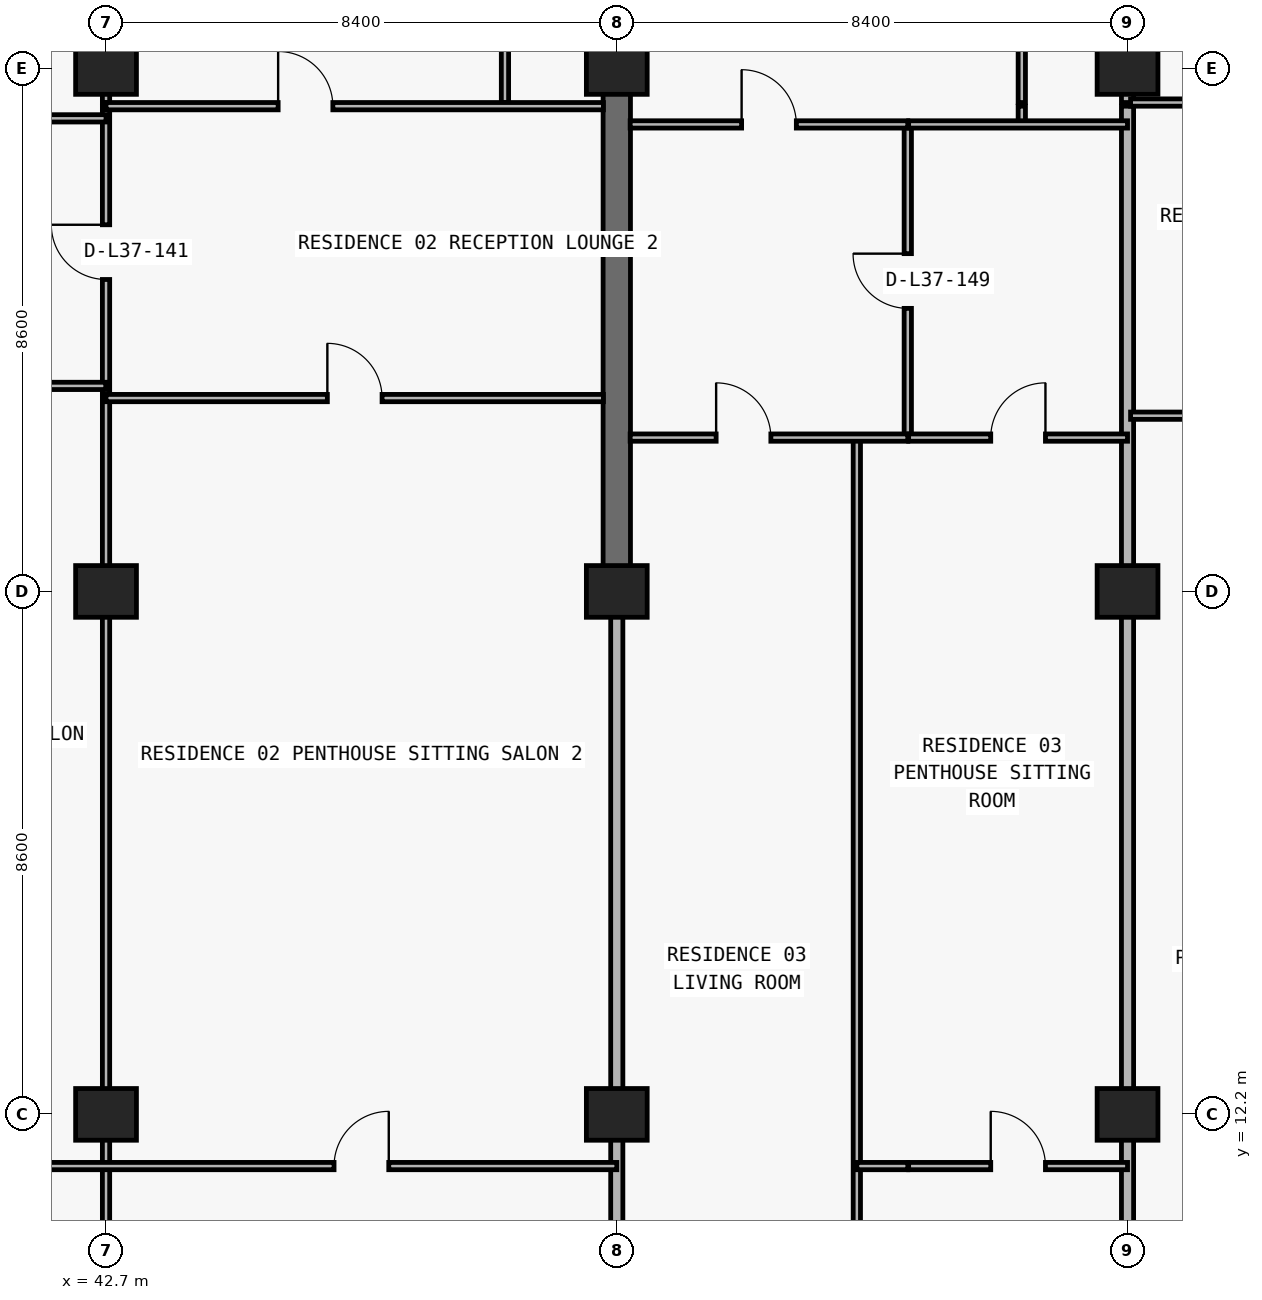
"""IFC4 building model, lengths in metres.
Left out: names, types, materials, properties, quantities, classifications, styles, units other than length and angle.
Written with IfcOpenShell. Run it as: python <this file> out.ifc"""

import sys

from ifc_helpers import new_model, si_unit, direction, frame, frame_2d, origin, origin_2d, place, context, subcontext, project, spatial, rectangle, extrude, element, fill, save


model = new_model("IFC4")
c1 = context("Model", 3, precision=1e-05, world=origin(), true_north=direction((0.0, 1.0)))
c2 = subcontext(c1, "Body", "Model", "MODEL_VIEW")
j1 = project(units=[si_unit("LENGTHUNIT", "METRE"), si_unit("PLANEANGLEUNIT", "RADIAN")], contexts=[c1])
p1 = place(None, origin())
s1 = spatial("IfcSite", under=j1, at=p1, CompositionType="ELEMENT")
p2 = place(p1, origin())
s2 = spatial("IfcBuilding", under=s1, at=p2, CompositionType="ELEMENT")
p3 = place(p2, frame((0.0, 0.0, 135.6)))
s3 = spatial("IfcBuildingStorey", under=s2, at=p3, CompositionType="ELEMENT", Elevation=135.6)
for number, where, z_axis, x_axis in (
    (1, (42.7, 12.2, 0.0), (0.0, 0.0, 1.0), (1.0, 0.0, 0.0)),
    (2, (51.1, 12.2, 0.0), (0.0, 0.0, 1.0), (1.0, 0.0, 0.0)),
    (3, (59.5, 12.2, 0.0), (0.0, 0.0, 1.0), (1.0, 0.0, 0.0)),
    (4, (42.7, 20.8, 0.0), (0.0, 0.0, 1.0), (1.0, 0.0, 0.0)),
    (5, (51.1, 20.8, 0.0), (0.0, 0.0, 1.0), (1.0, 0.0, 0.0)),
    (6, (59.5, 20.8, 0.0), (0.0, 0.0, 1.0), (1.0, 0.0, 0.0)),
    (7, (42.7, 29.4, 0.0), (0.0, 0.0, 1.0), (1.0, 0.0, 0.0)),
    (8, (51.1, 29.4, 0.0), (0.0, 0.0, 1.0), (1.0, 0.0, 0.0)),
    (9, (59.5, 29.4, 0.0), (0.0, 0.0, 1.0), (1.0, 0.0, 0.0)),
):
    element("IfcColumn", number, at=place(p3, frame(where, z_axis=z_axis, x_axis=x_axis)), inside=s3, PredefinedType="COLUMN", context=c2, shape_type="SweptSolid", body=[
        extrude(rectangle(XDim=1.0, YDim=0.85, at=origin_2d()), origin(), (0.0, 0.0, 1.0), 3.05),
    ])
p4 = place(p3, frame((51.1, 20.8, 0.0), z_axis=(0.0, 0.0, 1.0), x_axis=(0.0, 1.0, 0.0)))
e10 = element("IfcWall", 10, at=p4, inside=s3, PredefinedType="SHEAR", context=c2, shape_type="SweptSolid", body=[
    extrude(rectangle(XDim=8.6, YDim=0.45, at=frame_2d((4.3, 0.0))), origin(), (0.0, 0.0, 1.0), 3.05),
])
p5 = place(p3, frame((42.7, 8.84, 0.0), z_axis=(0.0, 0.0, 1.0), x_axis=(0.0, 1.0, 0.0)))
e11 = element("IfcWall", 11, at=p5, inside=s3, PredefinedType="PARTITIONING", context=c2, shape_type="SweptSolid", body=[
    extrude(rectangle(XDim=19.94, YDim=0.12, at=frame_2d((9.97, 0.0))), origin(), (0.0, 0.0, 1.0), 2.174),
])
p6 = place(p5, frame((17.09, 0.0, 0.0)))
e12 = element("IfcOpeningElement", 12, at=p6, cuts=e11, PredefinedType="OPENING", context=c2, shape_type="SweptSolid", body=[
    extrude(rectangle(XDim=0.9, YDim=2.124, at=frame_2d((0.45, 1.062))), frame((0.0, 0.07, 0.0), z_axis=(0.0, -1.0, 0.0), x_axis=(1.0, 0.0, 0.0)), (0.0, 0.0, 1.0), 0.14),
])
p7 = place(p3, frame((42.7, 28.84, 0.0), z_axis=(0.0, 0.0, 1.0), x_axis=(0.0, 1.0, 0.0)))
e13 = element("IfcWall", 13, at=p7, inside=s3, PredefinedType="PARTITIONING", context=c2, shape_type="SweptSolid", body=[
    extrude(rectangle(XDim=5.16, YDim=0.12, at=frame_2d((2.58, 0.0))), origin(), (0.0, 0.0, 1.0), 2.174),
])
p8 = place(p3, frame((49.261, 28.84, 0.0), z_axis=(0.0, 0.0, 1.0), x_axis=(0.0, 1.0, 0.0)))
e14 = element("IfcWall", 14, at=p8, inside=s3, PredefinedType="PARTITIONING", context=c2, shape_type="SweptSolid", body=[
    extrude(rectangle(XDim=5.16, YDim=0.12, at=frame_2d((2.58, 0.0))), origin(), (0.0, 0.0, 1.0), 2.679),
])
p9 = place(p8, frame((2.155, 0.0, 0.0)))
e15 = element("IfcOpeningElement", 15, at=p9, cuts=e14, PredefinedType="OPENING", context=c2, shape_type="SweptSolid", body=[
    extrude(rectangle(XDim=0.85, YDim=2.1, at=frame_2d((0.425, 1.05))), frame((0.0, 0.07, 0.0), z_axis=(0.0, -1.0, 0.0), x_axis=(1.0, 0.0, 0.0)), (0.0, 0.0, 1.0), 0.14),
])
p10 = place(p3, frame((51.1, 8.84, 0.0), z_axis=(0.0, 0.0, 1.0), x_axis=(0.0, 1.0, 0.0)))
e16 = element("IfcWall", 16, at=p10, inside=s3, PredefinedType="PARTITIONING", context=c2, shape_type="SweptSolid", body=[
    extrude(rectangle(XDim=11.955, YDim=0.2, at=frame_2d((5.978, 0.0))), origin(), (0.0, 0.0, 1.0), 2.174),
])
p11 = place(p3, frame((51.1, 29.405, 0.0), z_axis=(0.0, 0.0, 1.0), x_axis=(0.0, 1.0, 0.0)))
e17 = element("IfcWall", 17, at=p11, inside=s3, PredefinedType="PARTITIONING", context=c2, shape_type="SweptSolid", body=[
    extrude(rectangle(XDim=4.595, YDim=0.2, at=frame_2d((2.297, 0.0))), origin(), (0.0, 0.0, 1.0), 2.335),
])
p12 = place(p3, frame((55.048, 8.84, 0.0), z_axis=(0.0, 0.0, 1.0), x_axis=(0.0, 1.0, 0.0)))
e18 = element("IfcWall", 18, at=p12, inside=s3, PredefinedType="PARTITIONING", context=c2, shape_type="SweptSolid", body=[
    extrude(rectangle(XDim=14.49, YDim=0.12, at=frame_2d((7.245, 0.0))), origin(), (0.0, 0.0, 1.0), 3.05),
])
p13 = place(p3, frame((55.886, 23.33, 0.0), z_axis=(0.0, 0.0, 1.0), x_axis=(0.0, 1.0, 0.0)))
e19 = element("IfcWall", 19, at=p13, inside=s3, PredefinedType="PARTITIONING", context=c2, shape_type="SweptSolid", body=[
    extrude(rectangle(XDim=5.15, YDim=0.12, at=frame_2d((2.575, 0.0))), origin(), (0.0, 0.0, 1.0), 3.05),
])
p14 = place(p13, frame((2.125, 0.0, 0.0)))
e20 = element("IfcOpeningElement", 20, at=p14, cuts=e19, PredefinedType="OPENING", context=c2, shape_type="SweptSolid", body=[
    extrude(rectangle(XDim=0.9, YDim=2.15, at=frame_2d((0.45, 1.075))), frame((0.0, 0.07, 0.0), z_axis=(0.0, -1.0, 0.0), x_axis=(1.0, 0.0, 0.0)), (0.0, 0.0, 1.0), 0.14),
])
p15 = place(p3, frame((57.761, 28.48, 0.0), z_axis=(0.0, 0.0, 1.0), x_axis=(0.0, 1.0, 0.0)))
e21 = element("IfcWall", 21, at=p15, inside=s3, PredefinedType="PARTITIONING", context=c2, shape_type="SweptSolid", body=[
    extrude(rectangle(XDim=0.3, YDim=0.12, at=frame_2d((0.15, 0.0))), origin(), (0.0, 0.0, 1.0), 3.05),
])
p16 = place(p3, frame((57.761, 28.84, 0.0), z_axis=(0.0, 0.0, 1.0), x_axis=(0.0, 1.0, 0.0)))
e22 = element("IfcWall", 22, at=p16, inside=s3, PredefinedType="PARTITIONING", context=c2, shape_type="SweptSolid", body=[
    extrude(rectangle(XDim=5.16, YDim=0.12, at=frame_2d((2.58, 0.0))), origin(), (0.0, 0.0, 1.0), 3.05),
])
p17 = place(p16, frame((2.155, 0.0, 0.0)))
e23 = element("IfcOpeningElement", 23, at=p17, cuts=e22, PredefinedType="OPENING", context=c2, shape_type="SweptSolid", body=[
    extrude(rectangle(XDim=0.85, YDim=2.1, at=frame_2d((0.425, 1.05))), frame((0.0, 0.07, 0.0), z_axis=(0.0, -1.0, 0.0), x_axis=(1.0, 0.0, 0.0)), (0.0, 0.0, 1.0), 0.14),
])
p18 = place(p3, frame((59.5, 8.84, 0.0), z_axis=(0.0, 0.0, 1.0), x_axis=(0.0, 1.0, 0.0)))
e24 = element("IfcWall", 24, at=p18, inside=s3, PredefinedType="PARTITIONING", context=c2, shape_type="SweptSolid", body=[
    extrude(rectangle(XDim=19.94, YDim=0.2, at=frame_2d((9.97, 0.0))), origin(), (0.0, 0.0, 1.0), 2.174),
])
p19 = place(p3, frame((59.5, 28.84, 0.0), z_axis=(0.0, 0.0, 1.0), x_axis=(0.0, 1.0, 0.0)))
e25 = element("IfcWall", 25, at=p19, inside=s3, PredefinedType="PARTITIONING", context=c2, shape_type="SweptSolid", body=[
    extrude(rectangle(XDim=5.16, YDim=0.2, at=frame_2d((2.58, 0.0))), origin(), (0.0, 0.0, 1.0), 2.174),
])
p20 = place(p3, frame((35.1, 11.35, 0.0), z_axis=(0.0, 0.0, 1.0), x_axis=(1.0, 0.0, 0.0)))
e26 = element("IfcWall", 26, at=p20, inside=s3, PredefinedType="PARTITIONING", context=c2, shape_type="SweptSolid", body=[
    extrude(rectangle(XDim=16.0, YDim=0.12, at=frame_2d((8.0, 0.0))), origin(), (0.0, 0.0, 1.0), 3.05),
])
p21 = place(p20, frame((3.35, 0.0, 0.0)))
e27 = element("IfcOpeningElement", 27, at=p21, cuts=e26, PredefinedType="OPENING", context=c2, shape_type="SweptSolid", body=[
    extrude(rectangle(XDim=0.9, YDim=2.15, at=frame_2d((0.45, 1.075))), frame((0.0, 0.07, 0.0), z_axis=(0.0, -1.0, 0.0), x_axis=(1.0, 0.0, 0.0)), (0.0, 0.0, 1.0), 0.14),
])
p22 = place(p20, frame((11.35, 0.0, 0.0)))
e28 = element("IfcOpeningElement", 28, at=p22, cuts=e26, PredefinedType="OPENING", context=c2, shape_type="SweptSolid", body=[
    extrude(rectangle(XDim=0.9, YDim=2.15, at=frame_2d((0.45, 1.075))), frame((0.0, 0.07, 0.0), z_axis=(0.0, -1.0, 0.0), x_axis=(1.0, 0.0, 0.0)), (0.0, 0.0, 1.0), 0.14),
])
p23 = place(p3, frame((55.048, 11.35, 0.0), z_axis=(0.0, 0.0, 1.0), x_axis=(1.0, 0.0, 0.0)))
e29 = element("IfcWall", 29, at=p23, inside=s3, PredefinedType="PARTITIONING", context=c2, shape_type="SweptSolid", body=[
    extrude(rectangle(XDim=0.838, YDim=0.12, at=frame_2d((0.419, 0.0))), origin(), (0.0, 0.0, 1.0), 3.05),
])
p24 = place(p3, frame((55.9, 11.35, 0.0), z_axis=(0.0, 0.0, 1.0), x_axis=(1.0, 0.0, 0.0)))
e30 = element("IfcWall", 30, at=p24, inside=s3, PredefinedType="PARTITIONING", context=c2, shape_type="SweptSolid", body=[
    extrude(rectangle(XDim=3.6, YDim=0.12, at=frame_2d((1.8, 0.0))), origin(), (0.0, 0.0, 1.0), 3.05),
])
p25 = place(p24, frame((1.35, 0.0, 0.0)))
e31 = element("IfcOpeningElement", 31, at=p25, cuts=e30, PredefinedType="OPENING", context=c2, shape_type="SweptSolid", body=[
    extrude(rectangle(XDim=0.9, YDim=2.15, at=frame_2d((0.45, 1.075))), frame((0.0, 0.07, 0.0), z_axis=(0.0, -1.0, 0.0), x_axis=(1.0, 0.0, 0.0)), (0.0, 0.0, 1.0), 0.14),
])
p26 = place(p3, frame((51.32, 23.33, 0.0), z_axis=(0.0, 0.0, 1.0), x_axis=(1.0, 0.0, 0.0)))
e32 = element("IfcWall", 32, at=p26, inside=s3, PredefinedType="PARTITIONING", context=c2, shape_type="SweptSolid", body=[
    extrude(rectangle(XDim=4.566, YDim=0.12, at=frame_2d((2.283, 0.0))), origin(), (0.0, 0.0, 1.0), 3.05),
])
p27 = place(p26, frame((1.414, 0.0, 0.0)))
e33 = element("IfcOpeningElement", 33, at=p27, cuts=e32, PredefinedType="OPENING", context=c2, shape_type="SweptSolid", body=[
    extrude(rectangle(XDim=0.9, YDim=2.15, at=frame_2d((0.45, 1.075))), frame((0.0, 0.07, 0.0), z_axis=(0.0, -1.0, 0.0), x_axis=(1.0, 0.0, 0.0)), (0.0, 0.0, 1.0), 0.14),
])
p28 = place(p3, frame((55.9, 23.33, 0.0), z_axis=(0.0, 0.0, 1.0), x_axis=(1.0, 0.0, 0.0)))
e34 = element("IfcWall", 34, at=p28, inside=s3, PredefinedType="PARTITIONING", context=c2, shape_type="SweptSolid", body=[
    extrude(rectangle(XDim=3.6, YDim=0.12, at=frame_2d((1.8, 0.0))), origin(), (0.0, 0.0, 1.0), 3.05),
])
p29 = place(p28, frame((1.35, 0.0, 0.0)))
e35 = element("IfcOpeningElement", 35, at=p29, cuts=e34, PredefinedType="OPENING", context=c2, shape_type="SweptSolid", body=[
    extrude(rectangle(XDim=0.9, YDim=2.15, at=frame_2d((0.45, 1.075))), frame((0.0, 0.07, 0.0), z_axis=(0.0, -1.0, 0.0), x_axis=(1.0, 0.0, 0.0)), (0.0, 0.0, 1.0), 0.14),
])
p30 = place(p3, frame((59.55, 23.69, 0.0), z_axis=(0.0, 0.0, 1.0), x_axis=(1.0, 0.0, 0.0)))
e36 = element("IfcWall", 36, at=p30, inside=s3, PredefinedType="PARTITIONING", context=c2, shape_type="SweptSolid", body=[
    extrude(rectangle(XDim=8.35, YDim=0.12, at=frame_2d((4.175, 0.0))), origin(), (0.0, 0.0, 1.0), 3.05),
])
p31 = place(p30, frame((1.668, 0.0, 0.0)))
e37 = element("IfcOpeningElement", 37, at=p31, cuts=e36, PredefinedType="OPENING", context=c2, shape_type="SweptSolid", body=[
    extrude(rectangle(XDim=0.9, YDim=2.15, at=frame_2d((0.45, 1.075))), frame((0.0, 0.07, 0.0), z_axis=(0.0, -1.0, 0.0), x_axis=(1.0, 0.0, 0.0)), (0.0, 0.0, 1.0), 0.14),
])
p32 = place(p30, frame((6.01, 0.0, 0.0)))
e38 = element("IfcOpeningElement", 38, at=p32, cuts=e36, PredefinedType="OPENING", context=c2, shape_type="SweptSolid", body=[
    extrude(rectangle(XDim=0.9, YDim=2.15, at=frame_2d((0.45, 1.075))), frame((0.0, 0.07, 0.0), z_axis=(0.0, -1.0, 0.0), x_axis=(1.0, 0.0, 0.0)), (0.0, 0.0, 1.0), 0.14),
])
p33 = place(p3, frame((42.7, 23.98, 0.0), z_axis=(0.0, 0.0, 1.0), x_axis=(1.0, 0.0, 0.0)))
e39 = element("IfcWall", 39, at=p33, inside=s3, PredefinedType="PARTITIONING", context=c2, shape_type="SweptSolid", body=[
    extrude(rectangle(XDim=8.18, YDim=0.12, at=frame_2d((4.09, 0.0))), origin(), (0.0, 0.0, 1.0), 3.05),
])
p34 = place(p33, frame((3.64, 0.0, 0.0)))
e40 = element("IfcOpeningElement", 40, at=p34, cuts=e39, PredefinedType="OPENING", context=c2, shape_type="SweptSolid", body=[
    extrude(rectangle(XDim=0.9, YDim=2.15, at=frame_2d((0.45, 1.075))), frame((0.0, 0.07, 0.0), z_axis=(0.0, -1.0, 0.0), x_axis=(1.0, 0.0, 0.0)), (0.0, 0.0, 1.0), 0.14),
])
p35 = place(p3, frame((35.105, 24.18, 0.0), z_axis=(0.0, 0.0, 1.0), x_axis=(1.0, 0.0, 0.0)))
e41 = element("IfcWall", 41, at=p35, inside=s3, PredefinedType="PARTITIONING", context=c2, shape_type="SweptSolid", body=[
    extrude(rectangle(XDim=7.59, YDim=0.12, at=frame_2d((3.795, 0.0))), origin(), (0.0, 0.0, 1.0), 3.05),
])
p36 = place(p35, frame((3.345, 0.0, 0.0)))
e42 = element("IfcOpeningElement", 42, at=p36, cuts=e41, PredefinedType="OPENING", context=c2, shape_type="SweptSolid", body=[
    extrude(rectangle(XDim=0.9, YDim=2.15, at=frame_2d((0.45, 1.075))), frame((0.0, 0.07, 0.0), z_axis=(0.0, -1.0, 0.0), x_axis=(1.0, 0.0, 0.0)), (0.0, 0.0, 1.0), 0.14),
])
p37 = place(p3, frame((51.32, 28.48, 0.0), z_axis=(0.0, 0.0, 1.0), x_axis=(1.0, 0.0, 0.0)))
e43 = element("IfcWall", 43, at=p37, inside=s3, PredefinedType="PARTITIONING", context=c2, shape_type="SweptSolid", body=[
    extrude(rectangle(XDim=4.566, YDim=0.12, at=frame_2d((2.283, 0.0))), origin(), (0.0, 0.0, 1.0), 3.05),
])
p38 = place(p37, frame((1.833, 0.0, 0.0)))
e44 = element("IfcOpeningElement", 44, at=p38, cuts=e43, PredefinedType="OPENING", context=c2, shape_type="SweptSolid", body=[
    extrude(rectangle(XDim=0.9, YDim=2.15, at=frame_2d((0.45, 1.075))), frame((0.0, 0.07, 0.0), z_axis=(0.0, -1.0, 0.0), x_axis=(1.0, 0.0, 0.0)), (0.0, 0.0, 1.0), 0.14),
])
p39 = place(p3, frame((55.9, 28.48, 0.0), z_axis=(0.0, 0.0, 1.0), x_axis=(1.0, 0.0, 0.0)))
e45 = element("IfcWall", 45, at=p39, inside=s3, PredefinedType="PARTITIONING", context=c2, shape_type="SweptSolid", body=[
    extrude(rectangle(XDim=3.6, YDim=0.12, at=frame_2d((1.8, 0.0))), origin(), (0.0, 0.0, 1.0), 3.05),
])
p40 = place(p3, frame((35.1, 28.58, 0.0), z_axis=(0.0, 0.0, 1.0), x_axis=(1.0, 0.0, 0.0)))
e46 = element("IfcWall", 46, at=p40, inside=s3, PredefinedType="PARTITIONING", context=c2, shape_type="SweptSolid", body=[
    extrude(rectangle(XDim=7.6, YDim=0.12, at=frame_2d((3.8, 0.0))), origin(), (0.0, 0.0, 1.0), 3.05),
])
p41 = place(p40, frame((2.418, 0.0, 0.0)))
e47 = element("IfcOpeningElement", 47, at=p41, cuts=e46, PredefinedType="OPENING", context=c2, shape_type="SweptSolid", body=[
    extrude(rectangle(XDim=0.9, YDim=2.15, at=frame_2d((0.45, 1.075))), frame((0.0, 0.07, 0.0), z_axis=(0.0, -1.0, 0.0), x_axis=(1.0, 0.0, 0.0)), (0.0, 0.0, 1.0), 0.14),
])
p42 = place(p3, frame((42.7, 28.78, 0.0), z_axis=(0.0, 0.0, 1.0), x_axis=(1.0, 0.0, 0.0)))
e48 = element("IfcWall", 48, at=p42, inside=s3, PredefinedType="PARTITIONING", context=c2, shape_type="SweptSolid", body=[
    extrude(rectangle(XDim=8.18, YDim=0.12, at=frame_2d((4.09, 0.0))), origin(), (0.0, 0.0, 1.0), 3.05),
])
p43 = place(p42, frame((2.831, 0.0, 0.0)))
e49 = element("IfcOpeningElement", 49, at=p43, cuts=e48, PredefinedType="OPENING", context=c2, shape_type="SweptSolid", body=[
    extrude(rectangle(XDim=0.9, YDim=2.15, at=frame_2d((0.45, 1.075))), frame((0.0, 0.07, 0.0), z_axis=(0.0, -1.0, 0.0), x_axis=(1.0, 0.0, 0.0)), (0.0, 0.0, 1.0), 0.14),
])
p44 = place(p3, frame((59.55, 28.84, 0.0), z_axis=(0.0, 0.0, 1.0), x_axis=(1.0, 0.0, 0.0)))
e50 = element("IfcWall", 50, at=p44, inside=s3, PredefinedType="PARTITIONING", context=c2, shape_type="SweptSolid", body=[
    extrude(rectangle(XDim=8.35, YDim=0.12, at=frame_2d((4.175, 0.0))), origin(), (0.0, 0.0, 1.0), 3.05),
])
p45 = place(p44, frame((1.668, 0.0, 0.0)))
e51 = element("IfcOpeningElement", 51, at=p45, cuts=e50, PredefinedType="OPENING", context=c2, shape_type="SweptSolid", body=[
    extrude(rectangle(XDim=0.9, YDim=2.15, at=frame_2d((0.45, 1.075))), frame((0.0, 0.07, 0.0), z_axis=(0.0, -1.0, 0.0), x_axis=(1.0, 0.0, 0.0)), (0.0, 0.0, 1.0), 0.14),
])
p46 = place(p6, origin())
e52 = element("IfcDoor", 52, at=p46, inside=s3, OperationType="SINGLE_SWING_RIGHT", PredefinedType="DOOR", context=c2, shape_type="SweptSolid", body=[
    extrude(rectangle(XDim=0.9, YDim=2.124, at=frame_2d((0.45, 1.062))), frame((0.0, 0.025, 0.0), z_axis=(0.0, -1.0, 0.0), x_axis=(1.0, 0.0, 0.0)), (0.0, 0.0, 1.0), 0.05),
])
fill(e12, e52)
p47 = place(p43, origin())
e53 = element("IfcDoor", 53, at=p47, inside=s3, OperationType="SINGLE_SWING_LEFT", PredefinedType="DOOR", context=c2, shape_type="SweptSolid", body=[
    extrude(rectangle(XDim=0.9, YDim=2.15, at=frame_2d((0.45, 1.075))), frame((0.0, 0.025, 0.0), z_axis=(0.0, -1.0, 0.0), x_axis=(1.0, 0.0, 0.0)), (0.0, 0.0, 1.0), 0.05),
])
fill(e49, e53)
p48 = place(p34, origin())
e54 = element("IfcDoor", 54, at=p48, inside=s3, OperationType="SINGLE_SWING_LEFT", PredefinedType="DOOR", context=c2, shape_type="SweptSolid", body=[
    extrude(rectangle(XDim=0.9, YDim=2.15, at=frame_2d((0.45, 1.075))), frame((0.0, 0.025, 0.0), z_axis=(0.0, -1.0, 0.0), x_axis=(1.0, 0.0, 0.0)), (0.0, 0.0, 1.0), 0.05),
])
fill(e40, e54)
p49 = place(p22, origin())
e55 = element("IfcDoor", 55, at=p49, inside=s3, OperationType="SINGLE_SWING_RIGHT", PredefinedType="DOOR", context=c2, shape_type="SweptSolid", body=[
    extrude(rectangle(XDim=0.9, YDim=2.15, at=frame_2d((0.45, 1.075))), frame((0.0, 0.025, 0.0), z_axis=(0.0, -1.0, 0.0), x_axis=(1.0, 0.0, 0.0)), (0.0, 0.0, 1.0), 0.05),
])
fill(e28, e55)
p50 = place(p38, origin())
e56 = element("IfcDoor", 56, at=p50, inside=s3, OperationType="SINGLE_SWING_LEFT", PredefinedType="DOOR", context=c2, shape_type="SweptSolid", body=[
    extrude(rectangle(XDim=0.9, YDim=2.15, at=frame_2d((0.45, 1.075))), frame((0.0, 0.025, 0.0), z_axis=(0.0, -1.0, 0.0), x_axis=(1.0, 0.0, 0.0)), (0.0, 0.0, 1.0), 0.05),
])
fill(e44, e56)
p51 = place(p14, origin())
e57 = element("IfcDoor", 57, at=p51, inside=s3, OperationType="SINGLE_SWING_RIGHT", PredefinedType="DOOR", context=c2, shape_type="SweptSolid", body=[
    extrude(rectangle(XDim=0.9, YDim=2.15, at=frame_2d((0.45, 1.075))), frame((0.0, 0.025, 0.0), z_axis=(0.0, -1.0, 0.0), x_axis=(1.0, 0.0, 0.0)), (0.0, 0.0, 1.0), 0.05),
])
fill(e20, e57)
p52 = place(p27, origin())
e58 = element("IfcDoor", 58, at=p52, inside=s3, OperationType="SINGLE_SWING_LEFT", PredefinedType="DOOR", context=c2, shape_type="SweptSolid", body=[
    extrude(rectangle(XDim=0.9, YDim=2.15, at=frame_2d((0.45, 1.075))), frame((0.0, 0.025, 0.0), z_axis=(0.0, -1.0, 0.0), x_axis=(1.0, 0.0, 0.0)), (0.0, 0.0, 1.0), 0.05),
])
fill(e33, e58)
p53 = place(p29, origin())
e59 = element("IfcDoor", 59, at=p53, inside=s3, OperationType="SINGLE_SWING_RIGHT", PredefinedType="DOOR", context=c2, shape_type="SweptSolid", body=[
    extrude(rectangle(XDim=0.9, YDim=2.15, at=frame_2d((0.45, 1.075))), frame((0.0, 0.025, 0.0), z_axis=(0.0, -1.0, 0.0), x_axis=(1.0, 0.0, 0.0)), (0.0, 0.0, 1.0), 0.05),
])
fill(e35, e59)
p54 = place(p25, origin())
e60 = element("IfcDoor", 60, at=p54, inside=s3, OperationType="SINGLE_SWING_LEFT", PredefinedType="DOOR", context=c2, shape_type="SweptSolid", body=[
    extrude(rectangle(XDim=0.9, YDim=2.15, at=frame_2d((0.45, 1.075))), frame((0.0, 0.025, 0.0), z_axis=(0.0, -1.0, 0.0), x_axis=(1.0, 0.0, 0.0)), (0.0, 0.0, 1.0), 0.05),
])
fill(e31, e60)
save(model, sys.argv[1])
